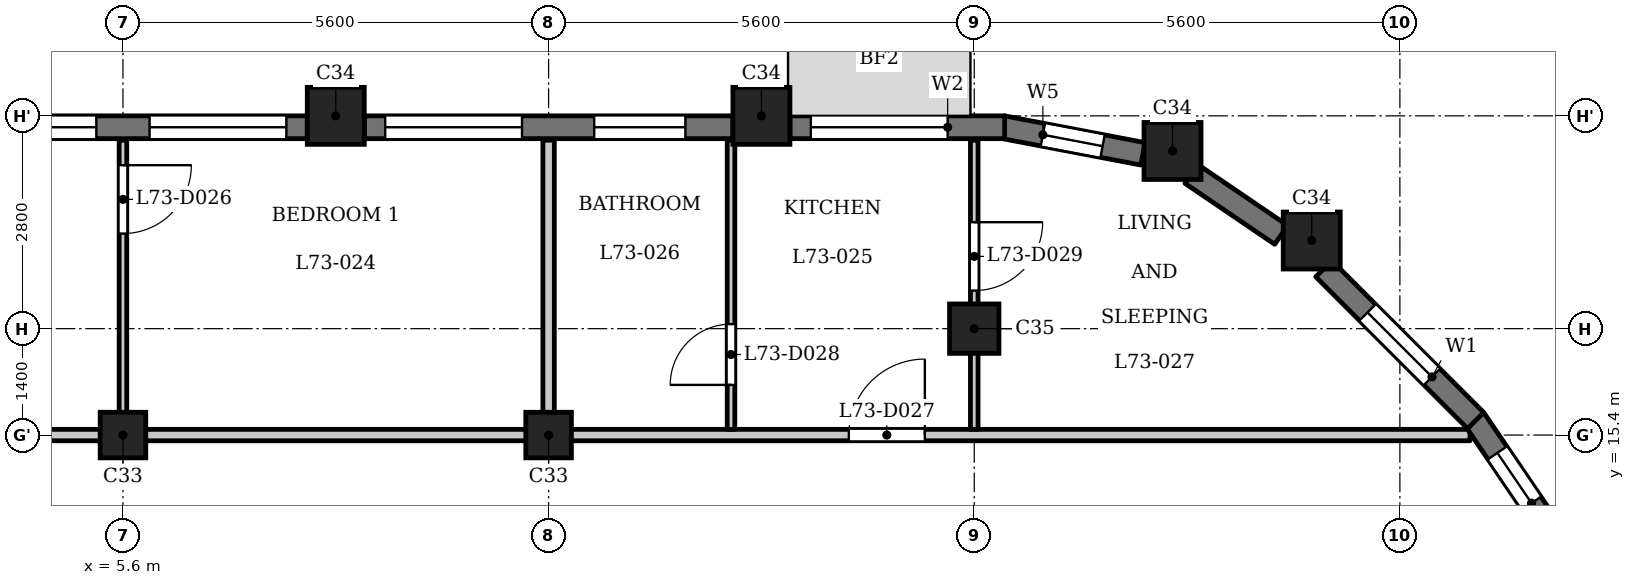
"""IFC4 building model, lengths in metres.
Left out: names, types, materials, properties, quantities, classifications, styles, units other than length and angle.
Written with IfcOpenShell. Run it as: python <this file> out.ifc"""

import sys

from ifc_helpers import new_model, si_unit, direction, frame, frame_2d, origin, origin_2d, place, context, subcontext, project, spatial, rectangle, extrude, element, fill, save


model = new_model("IFC4")
c1 = context("Model", 3, precision=1e-05, world=origin(), true_north=direction((0.0, 1.0)))
c2 = subcontext(c1, "Body", "Model", "MODEL_VIEW")
j1 = project(units=[si_unit("LENGTHUNIT", "METRE"), si_unit("PLANEANGLEUNIT", "RADIAN")], contexts=[c1])
p1 = place(None, origin())
s1 = spatial("IfcSite", under=j1, at=p1, CompositionType="ELEMENT")
p2 = place(p1, origin())
s2 = spatial("IfcBuilding", under=s1, at=p2, CompositionType="ELEMENT")
p3 = place(p2, frame((0.0, 0.0, 280.2)))
s3 = spatial("IfcBuildingStorey", under=s2, at=p3, CompositionType="ELEMENT", Elevation=280.2)
for number, where, z_axis, x_axis in (
    (1, (21.24, 17.96, 0.0), (0.0, 0.0, 1.0), (1.0, 0.0, 0.0)),
    (2, (19.409, 19.138, 0.0), (0.0, 0.0, 1.0), (1.0, 0.0, 0.0)),
    (3, (14.0, 19.6, 0.0), (0.0, 0.0, 1.0), (1.0, 0.0, 0.0)),
    (4, (8.4, 19.6, 0.0), (0.0, 0.0, 1.0), (1.0, 0.0, 0.0)),
):
    element("IfcColumn", number, at=place(p3, frame(where, z_axis=z_axis, x_axis=x_axis)), inside=s3, PredefinedType="COLUMN", context=c2, shape_type="SweptSolid", body=[
        extrude(rectangle(XDim=0.75, YDim=0.75, at=origin_2d()), origin(), (0.0, 0.0, 1.0), 3.5),
    ])
p4 = place(p3, frame((16.8, 16.8, 0.0), z_axis=(0.0, 0.0, 1.0), x_axis=(1.0, 0.0, 0.0)))
e5 = element("IfcColumn", 5, at=p4, inside=s3, PredefinedType="COLUMN", context=c2, shape_type="SweptSolid", body=[
    extrude(rectangle(XDim=0.65, YDim=0.65, at=origin_2d()), origin(), (0.0, 0.0, 1.0), 3.5),
])
for number, where, z_axis, x_axis in (
    (6, (5.6, 15.4, 0.0), (0.0, 0.0, 1.0), (1.0, 0.0, 0.0)),
    (7, (11.2, 15.4, 0.0), (0.0, 0.0, 1.0), (1.0, 0.0, 0.0)),
):
    element("IfcColumn", number, at=place(p3, frame(where, z_axis=z_axis, x_axis=x_axis)), inside=s3, PredefinedType="COLUMN", context=c2, shape_type="SweptSolid", body=[
        extrude(rectangle(XDim=0.6, YDim=0.6, at=origin_2d()), origin(), (0.0, 0.0, 1.0), 3.5),
    ])
p5 = place(p3, frame((24.436, 14.057, 0.0), z_axis=(0.0, 0.0, 1.0), x_axis=(-0.562075713892, 0.827085782645, 0.0)))
e8 = element("IfcWall", 8, at=p5, inside=s3, PredefinedType="SOLIDWALL", context=c2, shape_type="SweptSolid", body=[
    extrude(rectangle(XDim=1.881, YDim=0.3, at=frame_2d((0.94, 0.0))), origin(), (0.0, 0.0, 1.0), 2.5),
])
p6 = place(p5, frame((0.541, 0.0, 0.6)))
e9 = element("IfcOpeningElement", 9, at=p6, cuts=e8, PredefinedType="OPENING", context=c2, shape_type="SweptSolid", body=[
    extrude(rectangle(XDim=0.8, YDim=1.55, at=frame_2d((0.4, 0.775))), frame((0.0, 0.16, 0.0), z_axis=(0.0, -1.0, 0.0), x_axis=(1.0, 0.0, 0.0)), (0.0, 0.0, 1.0), 0.32),
])
p7 = place(p3, frame((23.397, 15.591, 0.0), z_axis=(0.0, 0.0, 1.0), x_axis=(-0.707106781187, 0.707106781187, 0.0)))
e10 = element("IfcWall", 10, at=p7, inside=s3, PredefinedType="SOLIDWALL", context=c2, shape_type="SweptSolid", body=[
    extrude(rectangle(XDim=2.825, YDim=0.3, at=frame_2d((1.413, 0.0))), origin(), (0.0, 0.0, 1.0), 2.5),
])
p8 = place(p7, frame((0.812, 0.0, 0.6)))
e11 = element("IfcOpeningElement", 11, at=p8, cuts=e10, PredefinedType="OPENING", context=c2, shape_type="SweptSolid", body=[
    extrude(rectangle(XDim=1.2, YDim=1.55, at=frame_2d((0.6, 0.775))), frame((0.0, 0.16, 0.0), z_axis=(0.0, -1.0, 0.0), x_axis=(1.0, 0.0, 0.0)), (0.0, 0.0, 1.0), 0.32),
])
p9 = place(p3, frame((20.837, 18.034, 0.0), z_axis=(0.0, 0.0, 1.0), x_axis=(-0.827095130818, 0.562061957952, 0.0)))
e12 = element("IfcWall", 12, at=p9, inside=s3, PredefinedType="SOLIDWALL", context=c2, shape_type="SweptSolid", body=[
    extrude(rectangle(XDim=1.427, YDim=0.3, at=frame_2d((0.713, 0.0))), origin(), (0.0, 0.0, 1.0), 2.5),
])
p10 = place(p3, frame((19.02, 19.1, 0.0), z_axis=(0.0, 0.0, 1.0), x_axis=(-0.982284001233, 0.187398348234, 0.0)))
e13 = element("IfcWall", 13, at=p10, inside=s3, PredefinedType="SOLIDWALL", context=c2, shape_type="SweptSolid", body=[
    extrude(rectangle(XDim=1.881, YDim=0.3, at=frame_2d((0.941, 0.0))), origin(), (0.0, 0.0, 1.0), 2.5),
])
p11 = place(p10, frame((0.541, 0.0, 0.6)))
e14 = element("IfcOpeningElement", 14, at=p11, cuts=e13, PredefinedType="OPENING", context=c2, shape_type="SweptSolid", body=[
    extrude(rectangle(XDim=0.8, YDim=1.55, at=frame_2d((0.4, 0.775))), frame((0.0, 0.16, 0.0), z_axis=(0.0, -1.0, 0.0), x_axis=(1.0, 0.0, 0.0)), (0.0, 0.0, 1.0), 0.32),
])
p12 = place(p3, frame((17.2, 19.45, 0.0), z_axis=(0.0, 0.0, 1.0), x_axis=(-1.0, 0.0, 0.0)))
e15 = element("IfcWall", 15, at=p12, inside=s3, PredefinedType="SOLIDWALL", context=c2, shape_type="SweptSolid", body=[
    extrude(rectangle(XDim=2.825, YDim=0.3, at=frame_2d((1.413, 0.0))), origin(), (0.0, 0.0, 1.0), 2.5),
])
p13 = place(p12, frame((0.75, 0.0, 0.9)))
e16 = element("IfcOpeningElement", 16, at=p13, cuts=e15, PredefinedType="OPENING", context=c2, shape_type="SweptSolid", body=[
    extrude(rectangle(XDim=1.8, YDim=1.25, at=frame_2d((0.9, 0.625))), frame((0.0, 0.16, 0.0), z_axis=(0.0, -1.0, 0.0), x_axis=(1.0, 0.0, 0.0)), (0.0, 0.0, 1.0), 0.32),
])
p14 = place(p3, frame((13.625, 19.45, 0.0), z_axis=(0.0, 0.0, 1.0), x_axis=(-1.0, 0.0, 0.0)))
e17 = element("IfcWall", 17, at=p14, inside=s3, PredefinedType="SOLIDWALL", context=c2, shape_type="SweptSolid", body=[
    extrude(rectangle(XDim=4.85, YDim=0.3, at=frame_2d((2.425, 0.0))), origin(), (0.0, 0.0, 1.0), 2.5),
])
p15 = place(p14, frame((0.625, 0.0, 0.6)))
e18 = element("IfcOpeningElement", 18, at=p15, cuts=e17, PredefinedType="OPENING", context=c2, shape_type="SweptSolid", body=[
    extrude(rectangle(XDim=1.2, YDim=1.55, at=frame_2d((0.6, 0.775))), frame((0.0, 0.16, 0.0), z_axis=(0.0, -1.0, 0.0), x_axis=(1.0, 0.0, 0.0)), (0.0, 0.0, 1.0), 0.32),
])
p16 = place(p14, frame((2.775, 0.0, 0.9)))
e19 = element("IfcOpeningElement", 19, at=p16, cuts=e17, PredefinedType="OPENING", context=c2, shape_type="SweptSolid", body=[
    extrude(rectangle(XDim=1.8, YDim=1.25, at=frame_2d((0.9, 0.625))), frame((0.0, 0.16, 0.0), z_axis=(0.0, -1.0, 0.0), x_axis=(1.0, 0.0, 0.0)), (0.0, 0.0, 1.0), 0.32),
])
p17 = place(p3, frame((8.025, 19.45, 0.0), z_axis=(0.0, 0.0, 1.0), x_axis=(-1.0, 0.0, 0.0)))
e20 = element("IfcWall", 20, at=p17, inside=s3, PredefinedType="SOLIDWALL", context=c2, shape_type="SweptSolid", body=[
    extrude(rectangle(XDim=4.85, YDim=0.3, at=frame_2d((2.425, 0.0))), origin(), (0.0, 0.0, 1.0), 2.5),
])
p18 = place(p17, frame((0.275, 0.0, 0.9)))
e21 = element("IfcOpeningElement", 21, at=p18, cuts=e20, PredefinedType="OPENING", context=c2, shape_type="SweptSolid", body=[
    extrude(rectangle(XDim=1.8, YDim=1.25, at=frame_2d((0.9, 0.625))), frame((0.0, 0.16, 0.0), z_axis=(0.0, -1.0, 0.0), x_axis=(1.0, 0.0, 0.0)), (0.0, 0.0, 1.0), 0.32),
])
p19 = place(p17, frame((2.775, 0.0, 0.9)))
e22 = element("IfcOpeningElement", 22, at=p19, cuts=e20, PredefinedType="OPENING", context=c2, shape_type="SweptSolid", body=[
    extrude(rectangle(XDim=1.8, YDim=1.25, at=frame_2d((0.9, 0.625))), frame((0.0, 0.16, 0.0), z_axis=(0.0, -1.0, 0.0), x_axis=(1.0, 0.0, 0.0)), (0.0, 0.0, 1.0), 0.32),
])
p20 = place(p3, frame((-23.55, 15.4, 0.0), z_axis=(0.0, 0.0, 1.0), x_axis=(1.0, 0.0, 0.0)))
e23 = element("IfcWall", 23, at=p20, inside=s3, PredefinedType="PARTITIONING", context=c2, shape_type="SweptSolid", body=[
    extrude(rectangle(XDim=46.872, YDim=0.15, at=frame_2d((23.436, 0.0))), origin(), (0.0, 0.0, 1.0), 3.15),
])
p21 = place(p20, frame((13.9, 0.0, 0.0)))
e24 = element("IfcOpeningElement", 24, at=p21, cuts=e23, PredefinedType="OPENING", context=c2, shape_type="SweptSolid", body=[
    extrude(rectangle(XDim=1.0, YDim=2.1, at=frame_2d((0.5, 1.05))), frame((0.0, 0.085, 0.0), z_axis=(0.0, -1.0, 0.0), x_axis=(1.0, 0.0, 0.0)), (0.0, 0.0, 1.0), 0.17),
])
p22 = place(p20, frame((21.9, 0.0, 0.0)))
e25 = element("IfcOpeningElement", 25, at=p22, cuts=e23, PredefinedType="OPENING", context=c2, shape_type="SweptSolid", body=[
    extrude(rectangle(XDim=1.0, YDim=2.1, at=frame_2d((0.5, 1.05))), frame((0.0, 0.085, 0.0), z_axis=(0.0, -1.0, 0.0), x_axis=(1.0, 0.0, 0.0)), (0.0, 0.0, 1.0), 0.17),
])
p23 = place(p20, frame((38.7, 0.0, 0.0)))
e26 = element("IfcOpeningElement", 26, at=p23, cuts=e23, PredefinedType="OPENING", context=c2, shape_type="SweptSolid", body=[
    extrude(rectangle(XDim=1.0, YDim=2.1, at=frame_2d((0.5, 1.05))), frame((0.0, 0.085, 0.0), z_axis=(0.0, -1.0, 0.0), x_axis=(1.0, 0.0, 0.0)), (0.0, 0.0, 1.0), 0.17),
])
p24 = place(p3, frame((5.6, 15.475, 0.0), z_axis=(0.0, 0.0, 1.0), x_axis=(0.0, 1.0, 0.0)))
e27 = element("IfcWall", 27, at=p24, inside=s3, PredefinedType="PARTITIONING", context=c2, shape_type="SweptSolid", body=[
    extrude(rectangle(XDim=3.805, YDim=0.1, at=frame_2d((1.902, 0.0))), origin(), (0.0, 0.0, 1.0), 3.15),
])
p25 = place(p24, frame((2.576, 0.0, 0.0)))
e28 = element("IfcOpeningElement", 28, at=p25, cuts=e27, PredefinedType="OPENING", context=c2, shape_type="SweptSolid", body=[
    extrude(rectangle(XDim=0.9, YDim=2.1, at=frame_2d((0.45, 1.05))), frame((0.0, 0.06, 0.0), z_axis=(0.0, -1.0, 0.0), x_axis=(1.0, 0.0, 0.0)), (0.0, 0.0, 1.0), 0.12),
])
p26 = place(p3, frame((11.2, 15.475, 0.0), z_axis=(0.0, 0.0, 1.0), x_axis=(0.0, 1.0, 0.0)))
e29 = element("IfcWall", 29, at=p26, inside=s3, PredefinedType="PARTITIONING", context=c2, shape_type="SweptSolid", body=[
    extrude(rectangle(XDim=3.805, YDim=0.15, at=frame_2d((1.902, 0.0))), origin(), (0.0, 0.0, 1.0), 3.15),
])
p27 = place(p3, frame((13.6, 15.475, 0.0), z_axis=(0.0, 0.0, 1.0), x_axis=(0.0, 1.0, 0.0)))
e30 = element("IfcWall", 30, at=p27, inside=s3, PredefinedType="PARTITIONING", context=c2, shape_type="SweptSolid", body=[
    extrude(rectangle(XDim=3.805, YDim=0.1, at=frame_2d((1.902, 0.0))), origin(), (0.0, 0.0, 1.0), 3.15),
])
p28 = place(p27, frame((0.585, 0.0, 0.0)))
e31 = element("IfcOpeningElement", 31, at=p28, cuts=e30, PredefinedType="OPENING", context=c2, shape_type="SweptSolid", body=[
    extrude(rectangle(XDim=0.8, YDim=2.1, at=frame_2d((0.4, 1.05))), frame((0.0, 0.06, 0.0), z_axis=(0.0, -1.0, 0.0), x_axis=(1.0, 0.0, 0.0)), (0.0, 0.0, 1.0), 0.12),
])
p29 = place(p3, frame((16.8, 15.475, 0.0), z_axis=(0.0, 0.0, 1.0), x_axis=(0.0, 1.0, 0.0)))
e32 = element("IfcWall", 32, at=p29, inside=s3, PredefinedType="PARTITIONING", context=c2, shape_type="SweptSolid", body=[
    extrude(rectangle(XDim=3.805, YDim=0.1, at=frame_2d((1.902, 0.0))), origin(), (0.0, 0.0, 1.0), 3.15),
])
p30 = place(p29, frame((1.826, 0.0, 0.0)))
e33 = element("IfcOpeningElement", 33, at=p30, cuts=e32, PredefinedType="OPENING", context=c2, shape_type="SweptSolid", body=[
    extrude(rectangle(XDim=0.9, YDim=2.1, at=frame_2d((0.45, 1.05))), frame((0.0, 0.06, 0.0), z_axis=(0.0, -1.0, 0.0), x_axis=(1.0, 0.0, 0.0)), (0.0, 0.0, 1.0), 0.12),
])
p31 = place(p25, origin())
e34 = element("IfcDoor", 34, at=p31, inside=s3, OperationType="SINGLE_SWING_RIGHT", PredefinedType="DOOR", context=c2, shape_type="SweptSolid", body=[
    extrude(rectangle(XDim=0.9, YDim=2.1, at=frame_2d((0.45, 1.05))), frame((0.0, 0.025, 0.0), z_axis=(0.0, -1.0, 0.0), x_axis=(1.0, 0.0, 0.0)), (0.0, 0.0, 1.0), 0.05),
])
fill(e28, e34)
p32 = place(p23, origin())
e35 = element("IfcDoor", 35, at=p32, inside=s3, OperationType="SINGLE_SWING_LEFT", PredefinedType="DOOR", context=c2, shape_type="SweptSolid", body=[
    extrude(rectangle(XDim=1.0, YDim=2.1, at=frame_2d((0.5, 1.05))), frame((0.0, 0.025, 0.0), z_axis=(0.0, -1.0, 0.0), x_axis=(1.0, 0.0, 0.0)), (0.0, 0.0, 1.0), 0.05),
])
fill(e26, e35)
p33 = place(p28, origin())
e36 = element("IfcDoor", 36, at=p33, inside=s3, OperationType="SINGLE_SWING_RIGHT", PredefinedType="DOOR", context=c2, shape_type="SweptSolid", body=[
    extrude(rectangle(XDim=0.8, YDim=2.1, at=frame_2d((0.4, 1.05))), frame((0.0, 0.025, 0.0), z_axis=(0.0, -1.0, 0.0), x_axis=(1.0, 0.0, 0.0)), (0.0, 0.0, 1.0), 0.05),
])
fill(e31, e36)
p34 = place(p30, origin())
e37 = element("IfcDoor", 37, at=p34, inside=s3, OperationType="SINGLE_SWING_RIGHT", PredefinedType="DOOR", context=c2, shape_type="SweptSolid", body=[
    extrude(rectangle(XDim=0.9, YDim=2.1, at=frame_2d((0.45, 1.05))), frame((0.0, 0.025, 0.0), z_axis=(0.0, -1.0, 0.0), x_axis=(1.0, 0.0, 0.0)), (0.0, 0.0, 1.0), 0.05),
])
fill(e33, e37)
p35 = place(p6, origin())
e38 = element("IfcWindow", 38, at=p35, inside=s3, PartitioningType="SINGLE_PANEL", PredefinedType="WINDOW", context=c2, shape_type="SweptSolid", body=[
    extrude(rectangle(XDim=0.8, YDim=1.55, at=frame_2d((0.4, 0.775))), frame((0.0, 0.03, 0.0), z_axis=(0.0, -1.0, 0.0), x_axis=(1.0, 0.0, 0.0)), (0.0, 0.0, 1.0), 0.06),
])
fill(e9, e38)
p36 = place(p8, origin())
e39 = element("IfcWindow", 39, at=p36, inside=s3, PartitioningType="SINGLE_PANEL", PredefinedType="WINDOW", context=c2, shape_type="SweptSolid", body=[
    extrude(rectangle(XDim=1.2, YDim=1.55, at=frame_2d((0.6, 0.775))), frame((0.0, 0.03, 0.0), z_axis=(0.0, -1.0, 0.0), x_axis=(1.0, 0.0, 0.0)), (0.0, 0.0, 1.0), 0.06),
])
fill(e11, e39)
p37 = place(p11, origin())
e40 = element("IfcWindow", 40, at=p37, inside=s3, PartitioningType="SINGLE_PANEL", PredefinedType="WINDOW", context=c2, shape_type="SweptSolid", body=[
    extrude(rectangle(XDim=0.8, YDim=1.55, at=frame_2d((0.4, 0.775))), frame((0.0, 0.03, 0.0), z_axis=(0.0, -1.0, 0.0), x_axis=(1.0, 0.0, 0.0)), (0.0, 0.0, 1.0), 0.06),
])
fill(e14, e40)
p38 = place(p13, origin())
e41 = element("IfcWindow", 41, at=p38, inside=s3, PartitioningType="SINGLE_PANEL", PredefinedType="WINDOW", context=c2, shape_type="SweptSolid", body=[
    extrude(rectangle(XDim=1.8, YDim=1.25, at=frame_2d((0.9, 0.625))), frame((0.0, 0.03, 0.0), z_axis=(0.0, -1.0, 0.0), x_axis=(1.0, 0.0, 0.0)), (0.0, 0.0, 1.0), 0.06),
])
fill(e16, e41)
p39 = place(p15, origin())
e42 = element("IfcWindow", 42, at=p39, inside=s3, PartitioningType="SINGLE_PANEL", PredefinedType="WINDOW", context=c2, shape_type="SweptSolid", body=[
    extrude(rectangle(XDim=1.2, YDim=1.55, at=frame_2d((0.6, 0.775))), frame((0.0, 0.03, 0.0), z_axis=(0.0, -1.0, 0.0), x_axis=(1.0, 0.0, 0.0)), (0.0, 0.0, 1.0), 0.06),
])
fill(e18, e42)
p40 = place(p16, origin())
e43 = element("IfcWindow", 43, at=p40, inside=s3, PartitioningType="SINGLE_PANEL", PredefinedType="WINDOW", context=c2, shape_type="SweptSolid", body=[
    extrude(rectangle(XDim=1.8, YDim=1.25, at=frame_2d((0.9, 0.625))), frame((0.0, 0.03, 0.0), z_axis=(0.0, -1.0, 0.0), x_axis=(1.0, 0.0, 0.0)), (0.0, 0.0, 1.0), 0.06),
])
fill(e19, e43)
p41 = place(p18, origin())
e44 = element("IfcWindow", 44, at=p41, inside=s3, PartitioningType="SINGLE_PANEL", PredefinedType="WINDOW", context=c2, shape_type="SweptSolid", body=[
    extrude(rectangle(XDim=1.8, YDim=1.25, at=frame_2d((0.9, 0.625))), frame((0.0, 0.03, 0.0), z_axis=(0.0, -1.0, 0.0), x_axis=(1.0, 0.0, 0.0)), (0.0, 0.0, 1.0), 0.06),
])
fill(e21, e44)
p42 = place(p19, origin())
e45 = element("IfcWindow", 45, at=p42, inside=s3, PartitioningType="SINGLE_PANEL", PredefinedType="WINDOW", context=c2, shape_type="SweptSolid", body=[
    extrude(rectangle(XDim=1.8, YDim=1.25, at=frame_2d((0.9, 0.625))), frame((0.0, 0.03, 0.0), z_axis=(0.0, -1.0, 0.0), x_axis=(1.0, 0.0, 0.0)), (0.0, 0.0, 1.0), 0.06),
])
fill(e22, e45)
save(model, sys.argv[1])
